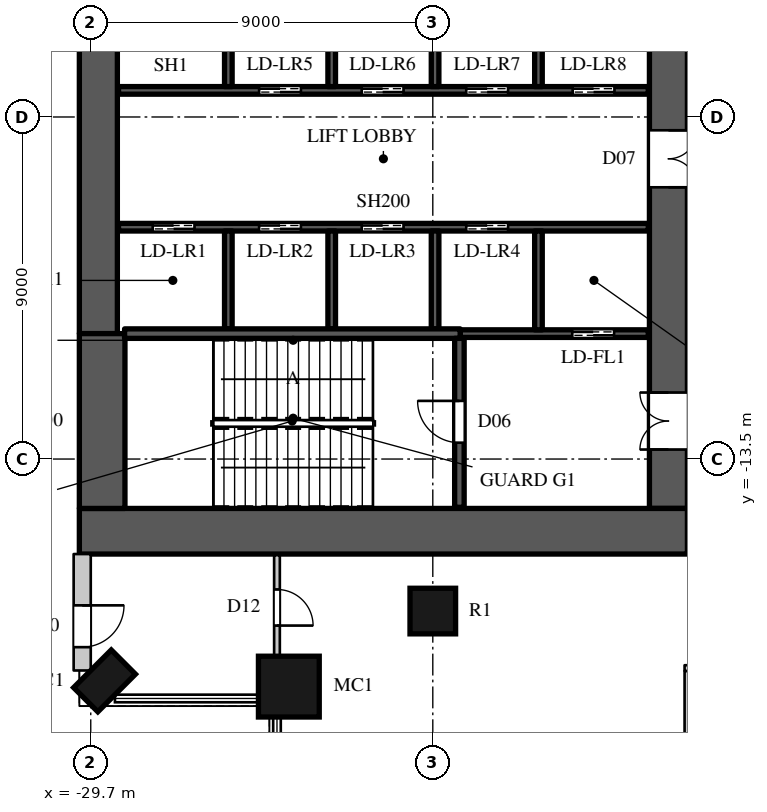
"""IFC4 building model, lengths in metres.
Left out: names, types, materials, properties, quantities, classifications, styles, units other than length and angle.
Written with IfcOpenShell. Run it as: python <this file> out.ifc"""

import sys

from ifc_helpers import new_model, si_unit, direction, frame, frame_2d, origin, origin_2d, place, context, subcontext, project, spatial, rectangle, circle, extrude, element, fill, save


model = new_model("IFC4")
c1 = context("Model", 3, precision=1e-05, world=origin(), true_north=direction((0.0, 1.0)))
c2 = subcontext(c1, "Body", "Model", "MODEL_VIEW")
j1 = project(units=[si_unit("LENGTHUNIT", "METRE"), si_unit("PLANEANGLEUNIT", "RADIAN")], contexts=[c1])
p1 = place(None, origin())
s1 = spatial("IfcSite", under=j1, at=p1, CompositionType="ELEMENT")
p2 = place(p1, origin())
s2 = spatial("IfcBuilding", under=s1, at=p2, CompositionType="ELEMENT")
p3 = place(p2, frame((0.0, 0.0, 50.0)))
s3 = spatial("IfcBuildingStorey", under=s2, at=p3, CompositionType="ELEMENT", Elevation=50.0)
p4 = place(p3, frame((-29.337, -19.337, 0.0), z_axis=(0.0, 0.0, 1.0), x_axis=(0.707106781187, -0.707106781187, 0.0)))
e1 = element("IfcColumn", 1, at=p4, inside=s3, PredefinedType="COLUMN", context=c2, shape_type="SweptSolid", body=[
    extrude(rectangle(XDim=0.9, YDim=1.4, at=origin_2d()), origin(), (0.0, 0.0, 1.0), 5.5),
])
p5 = place(p3, frame((-24.488, -19.488, 0.0), z_axis=(0.0, 0.0, 1.0), x_axis=(1.0, 0.0, 0.0)))
e2 = element("IfcColumn", 2, at=p5, inside=s3, PredefinedType="COLUMN", context=c2, shape_type="SweptSolid", body=[
    extrude(circle(Radius=0.8, at=origin_2d()), origin(), (0.0, 0.0, 1.0), 5.5),
])
p6 = place(p3, frame((-20.7, -17.5, 0.0), z_axis=(0.0, 0.0, 1.0), x_axis=(1.0, 0.0, 0.0)))
e3 = element("IfcColumn", 3, at=p6, inside=s3, PredefinedType="COLUMN", context=c2, shape_type="SweptSolid", body=[
    extrude(circle(Radius=0.6, at=origin_2d()), origin(), (0.0, 0.0, 1.0), 5.5),
])
p7 = place(p3, frame((-29.925, -16.0, 0.0), z_axis=(0.0, 0.0, 1.0), x_axis=(0.0, -1.0, 0.0)))
e4 = element("IfcWall", 4, at=p7, inside=s3, PredefinedType="SOLIDWALL", context=c2, shape_type="SweptSolid", body=[
    extrude(rectangle(XDim=3.064, YDim=0.45, at=frame_2d((1.532, 0.0))), origin(), (0.0, 0.0, 1.0), 5.2),
])
p8 = place(p7, frame((1.35, 0.0, 0.0)))
e5 = element("IfcOpeningElement", 5, at=p8, cuts=e4, PredefinedType="OPENING", context=c2, shape_type="SweptSolid", body=[
    extrude(rectangle(XDim=1.1, YDim=2.4, at=frame_2d((0.55, 1.2))), frame((0.0, 0.235, 0.0), z_axis=(0.0, -1.0, 0.0), x_axis=(1.0, 0.0, 0.0)), (0.0, 0.0, 1.0), 0.47),
])
p9 = place(p3, frame((-30.0, -15.4, 0.0), z_axis=(0.0, 0.0, 1.0), x_axis=(1.0, 0.0, 0.0)))
e6 = element("IfcWall", 6, at=p9, inside=s3, PredefinedType="SHEAR", context=c2, shape_type="SweptSolid", body=[
    extrude(rectangle(XDim=16.0, YDim=1.2, at=frame_2d((8.0, 0.0))), origin(), (0.0, 0.0, 1.0), 5.5),
])
p10 = place(p3, frame((-14.5, -14.8, 0.0), z_axis=(0.0, 0.0, 1.0), x_axis=(0.0, 1.0, 0.0)))
e7 = element("IfcWall", 7, at=p10, inside=s3, PredefinedType="SHEAR", context=c2, shape_type="SweptSolid", body=[
    extrude(rectangle(XDim=29.6, YDim=1.0, at=frame_2d((14.8, 0.0))), origin(), (0.0, 0.0, 1.0), 5.5),
])
p11 = place(p10, frame((1.55, 0.0, 0.0)))
e8 = element("IfcOpeningElement", 8, at=p11, cuts=e7, PredefinedType="OPENING", context=c2, shape_type="SweptSolid", body=[
    extrude(rectangle(XDim=1.5, YDim=2.4, at=frame_2d((0.75, 1.2))), frame((0.0, 0.51, 0.0), z_axis=(0.0, -1.0, 0.0), x_axis=(1.0, 0.0, 0.0)), (0.0, 0.0, 1.0), 1.02),
])
p12 = place(p10, frame((26.55, 0.0, 0.0)))
e9 = element("IfcOpeningElement", 9, at=p12, cuts=e7, PredefinedType="OPENING", context=c2, shape_type="SweptSolid", body=[
    extrude(rectangle(XDim=1.5, YDim=2.4, at=frame_2d((0.75, 1.2))), frame((0.0, 0.51, 0.0), z_axis=(0.0, -1.0, 0.0), x_axis=(1.0, 0.0, 0.0)), (0.0, 0.0, 1.0), 1.02),
])
p13 = place(p10, frame((8.45, 0.0, 0.0)))
e10 = element("IfcOpeningElement", 10, at=p13, cuts=e7, PredefinedType="OPENING", context=c2, shape_type="SweptSolid", body=[
    extrude(rectangle(XDim=1.5, YDim=2.4, at=frame_2d((0.75, 1.2))), frame((0.0, 0.51, 0.0), z_axis=(0.0, -1.0, 0.0), x_axis=(1.0, 0.0, 0.0)), (0.0, 0.0, 1.0), 1.02),
])
p14 = place(p10, frame((19.65, 0.0, 0.0)))
e11 = element("IfcOpeningElement", 11, at=p14, cuts=e7, PredefinedType="OPENING", context=c2, shape_type="SweptSolid", body=[
    extrude(rectangle(XDim=1.5, YDim=2.4, at=frame_2d((0.75, 1.2))), frame((0.0, 0.51, 0.0), z_axis=(0.0, -1.0, 0.0), x_axis=(1.0, 0.0, 0.0)), (0.0, 0.0, 1.0), 1.02),
])
p15 = place(p10, frame((14.5, 0.0, 0.0)))
e12 = element("IfcOpeningElement", 12, at=p15, cuts=e7, PredefinedType="OPENING", context=c2, shape_type="SweptSolid", body=[
    extrude(rectangle(XDim=0.6, YDim=2.0, at=frame_2d((0.3, 1.0))), frame((0.0, 0.51, 0.0), z_axis=(0.0, -1.0, 0.0), x_axis=(1.0, 0.0, 0.0)), (0.0, 0.0, 1.0), 1.02),
])
p16 = place(p3, frame((-29.5, -10.2, 0.0), z_axis=(0.0, 0.0, 1.0), x_axis=(0.0, 1.0, 0.0)))
e13 = element("IfcWall", 13, at=p16, inside=s3, PredefinedType="SHEAR", context=c2, shape_type="SweptSolid", body=[
    extrude(rectangle(XDim=20.4, YDim=1.0, at=frame_2d((10.2, 0.0))), origin(), (0.0, 0.0, 1.0), 5.5),
])
p17 = place(p3, frame((-29.4, -14.8, 0.0), z_axis=(0.0, 0.0, 1.0), x_axis=(0.0, 1.0, 0.0)))
e14 = element("IfcWall", 14, at=p17, inside=s3, PredefinedType="SHEAR", context=c2, shape_type="SweptSolid", body=[
    extrude(rectangle(XDim=4.6, YDim=1.2, at=frame_2d((2.3, 0.0))), origin(), (0.0, 0.0, 1.0), 5.5),
])
p18 = place(p3, frame((-24.8, -18.732, 0.0), z_axis=(0.0, 0.0, 1.0), x_axis=(0.0, 1.0, 0.0)))
e15 = element("IfcWall", 15, at=p18, inside=s3, PredefinedType="PARTITIONING", context=c2, shape_type="SweptSolid", body=[
    extrude(rectangle(XDim=2.702, YDim=0.15, at=frame_2d((1.351, 0.0))), origin(), (0.0, 0.0, 1.0), 5.2),
])
p19 = place(p18, frame((0.85, 0.0, 0.0)))
e16 = element("IfcOpeningElement", 16, at=p19, cuts=e15, PredefinedType="OPENING", context=c2, shape_type="SweptSolid", body=[
    extrude(rectangle(XDim=0.95, YDim=2.2, at=frame_2d((0.475, 1.1))), frame((0.0, 0.085, 0.0), z_axis=(0.0, -1.0, 0.0), x_axis=(1.0, 0.0, 0.0)), (0.0, 0.0, 1.0), 0.17),
])
p20 = place(p3, frame((-14.0, -25.755, 0.0), z_axis=(0.0, 0.0, 1.0), x_axis=(0.0, 1.0, 0.0)))
e17 = element("IfcWall", 17, at=p20, inside=s3, PredefinedType="PARTITIONING", context=c2, shape_type="SweptSolid", body=[
    extrude(rectangle(XDim=6.68, YDim=0.15, at=frame_2d((3.34, 0.0))), origin(), (0.0, 0.0, 1.0), 5.2),
])
p21 = place(p20, frame((2.9, 0.0, 0.0)))
e18 = element("IfcOpeningElement", 18, at=p21, cuts=e17, PredefinedType="OPENING", context=c2, shape_type="SweptSolid", body=[
    extrude(rectangle(XDim=0.9, YDim=2.2, at=frame_2d((0.45, 1.1))), frame((0.0, 0.085, 0.0), z_axis=(0.0, -1.0, 0.0), x_axis=(1.0, 0.0, 0.0)), (0.0, 0.0, 1.0), 0.17),
])
p22 = place(p3, frame((-14.075, -19.0, 0.0), z_axis=(0.0, 0.0, 1.0), x_axis=(1.0, 0.0, 0.0)))
e19 = element("IfcWall", 19, at=p22, inside=s3, PredefinedType="PARTITIONING", context=c2, shape_type="SweptSolid", body=[
    extrude(rectangle(XDim=10.15, YDim=0.15, at=frame_2d((5.075, 0.0))), origin(), (0.0, 0.0, 1.0), 5.2),
])
p23 = place(p3, frame((-28.97, -7.4, 0.0), z_axis=(0.0, 0.0, 1.0), x_axis=(1.0, 0.0, 0.0)))
e20 = element("IfcWall", 20, at=p23, inside=s3, PredefinedType="SHEAR", context=c2, shape_type="SweptSolid", body=[
    extrude(rectangle(XDim=13.94, YDim=0.2, at=frame_2d((6.97, 0.0))), origin(), (0.0, 0.0, 1.0), 5.2),
])
p24 = place(p23, frame((0.9, 0.0, 0.0)))
e21 = element("IfcOpeningElement", 21, at=p24, cuts=e20, PredefinedType="OPENING", context=c2, shape_type="SweptSolid", body=[
    extrude(rectangle(XDim=1.1, YDim=2.2, at=frame_2d((0.55, 1.1))), frame((0.0, 0.11, 0.0), z_axis=(0.0, -1.0, 0.0), x_axis=(1.0, 0.0, 0.0)), (0.0, 0.0, 1.0), 0.22),
])
p25 = place(p23, frame((3.7, 0.0, 0.0)))
e22 = element("IfcOpeningElement", 22, at=p25, cuts=e20, PredefinedType="OPENING", context=c2, shape_type="SweptSolid", body=[
    extrude(rectangle(XDim=1.1, YDim=2.2, at=frame_2d((0.55, 1.1))), frame((0.0, 0.11, 0.0), z_axis=(0.0, -1.0, 0.0), x_axis=(1.0, 0.0, 0.0)), (0.0, 0.0, 1.0), 0.22),
])
p26 = place(p23, frame((6.4, 0.0, 0.0)))
e23 = element("IfcOpeningElement", 23, at=p26, cuts=e20, PredefinedType="OPENING", context=c2, shape_type="SweptSolid", body=[
    extrude(rectangle(XDim=1.1, YDim=2.2, at=frame_2d((0.55, 1.1))), frame((0.0, 0.11, 0.0), z_axis=(0.0, -1.0, 0.0), x_axis=(1.0, 0.0, 0.0)), (0.0, 0.0, 1.0), 0.22),
])
p27 = place(p23, frame((9.15, 0.0, 0.0)))
e24 = element("IfcOpeningElement", 24, at=p27, cuts=e20, PredefinedType="OPENING", context=c2, shape_type="SweptSolid", body=[
    extrude(rectangle(XDim=1.1, YDim=2.2, at=frame_2d((0.55, 1.1))), frame((0.0, 0.11, 0.0), z_axis=(0.0, -1.0, 0.0), x_axis=(1.0, 0.0, 0.0)), (0.0, 0.0, 1.0), 0.22),
])
p28 = place(p3, frame((-28.97, -3.8, 0.0), z_axis=(0.0, 0.0, 1.0), x_axis=(1.0, 0.0, 0.0)))
e25 = element("IfcWall", 25, at=p28, inside=s3, PredefinedType="SHEAR", context=c2, shape_type="SweptSolid", body=[
    extrude(rectangle(XDim=13.94, YDim=0.2, at=frame_2d((6.97, 0.0))), origin(), (0.0, 0.0, 1.0), 5.2),
])
p29 = place(p28, frame((3.7, 0.0, 0.0)))
e26 = element("IfcOpeningElement", 26, at=p29, cuts=e25, PredefinedType="OPENING", context=c2, shape_type="SweptSolid", body=[
    extrude(rectangle(XDim=1.1, YDim=2.2, at=frame_2d((0.55, 1.1))), frame((0.0, 0.11, 0.0), z_axis=(0.0, -1.0, 0.0), x_axis=(1.0, 0.0, 0.0)), (0.0, 0.0, 1.0), 0.22),
])
p30 = place(p28, frame((6.4, 0.0, 0.0)))
e27 = element("IfcOpeningElement", 27, at=p30, cuts=e25, PredefinedType="OPENING", context=c2, shape_type="SweptSolid", body=[
    extrude(rectangle(XDim=1.1, YDim=2.2, at=frame_2d((0.55, 1.1))), frame((0.0, 0.11, 0.0), z_axis=(0.0, -1.0, 0.0), x_axis=(1.0, 0.0, 0.0)), (0.0, 0.0, 1.0), 0.22),
])
p31 = place(p28, frame((9.15, 0.0, 0.0)))
e28 = element("IfcOpeningElement", 28, at=p31, cuts=e25, PredefinedType="OPENING", context=c2, shape_type="SweptSolid", body=[
    extrude(rectangle(XDim=1.1, YDim=2.2, at=frame_2d((0.55, 1.1))), frame((0.0, 0.11, 0.0), z_axis=(0.0, -1.0, 0.0), x_axis=(1.0, 0.0, 0.0)), (0.0, 0.0, 1.0), 0.22),
])
p32 = place(p28, frame((11.95, 0.0, 0.0)))
e29 = element("IfcOpeningElement", 29, at=p32, cuts=e25, PredefinedType="OPENING", context=c2, shape_type="SweptSolid", body=[
    extrude(rectangle(XDim=1.1, YDim=2.2, at=frame_2d((0.55, 1.1))), frame((0.0, 0.11, 0.0), z_axis=(0.0, -1.0, 0.0), x_axis=(1.0, 0.0, 0.0)), (0.0, 0.0, 1.0), 0.22),
])
p33 = place(p3, frame((-26.08, -10.075, 0.0), z_axis=(0.0, 0.0, 1.0), x_axis=(0.0, 1.0, 0.0)))
e30 = element("IfcWall", 30, at=p33, inside=s3, PredefinedType="SHEAR", context=c2, shape_type="SweptSolid", body=[
    extrude(rectangle(XDim=2.575, YDim=0.2, at=frame_2d((1.288, 0.0))), origin(), (0.0, 0.0, 1.0), 5.5),
])
p34 = place(p3, frame((-26.08, -3.7, 0.0), z_axis=(0.0, 0.0, 1.0), x_axis=(0.0, 1.0, 0.0)))
e31 = element("IfcWall", 31, at=p34, inside=s3, PredefinedType="SHEAR", context=c2, shape_type="SweptSolid", body=[
    extrude(rectangle(XDim=2.6, YDim=0.2, at=frame_2d((1.3, 0.0))), origin(), (0.0, 0.0, 1.0), 5.5),
])
p35 = place(p3, frame((-23.36, -10.075, 0.0), z_axis=(0.0, 0.0, 1.0), x_axis=(0.0, 1.0, 0.0)))
e32 = element("IfcWall", 32, at=p35, inside=s3, PredefinedType="SHEAR", context=c2, shape_type="SweptSolid", body=[
    extrude(rectangle(XDim=2.575, YDim=0.2, at=frame_2d((1.288, 0.0))), origin(), (0.0, 0.0, 1.0), 5.5),
])
p36 = place(p3, frame((-23.36, -3.7, 0.0), z_axis=(0.0, 0.0, 1.0), x_axis=(0.0, 1.0, 0.0)))
e33 = element("IfcWall", 33, at=p36, inside=s3, PredefinedType="SHEAR", context=c2, shape_type="SweptSolid", body=[
    extrude(rectangle(XDim=2.6, YDim=0.2, at=frame_2d((1.3, 0.0))), origin(), (0.0, 0.0, 1.0), 5.5),
])
p37 = place(p3, frame((-20.64, -10.075, 0.0), z_axis=(0.0, 0.0, 1.0), x_axis=(0.0, 1.0, 0.0)))
e34 = element("IfcWall", 34, at=p37, inside=s3, PredefinedType="SHEAR", context=c2, shape_type="SweptSolid", body=[
    extrude(rectangle(XDim=2.575, YDim=0.2, at=frame_2d((1.288, 0.0))), origin(), (0.0, 0.0, 1.0), 5.5),
])
p38 = place(p3, frame((-20.64, -3.7, 0.0), z_axis=(0.0, 0.0, 1.0), x_axis=(0.0, 1.0, 0.0)))
e35 = element("IfcWall", 35, at=p38, inside=s3, PredefinedType="SHEAR", context=c2, shape_type="SweptSolid", body=[
    extrude(rectangle(XDim=2.6, YDim=0.2, at=frame_2d((1.3, 0.0))), origin(), (0.0, 0.0, 1.0), 5.5),
])
p39 = place(p3, frame((-19.98, -10.2, 0.0), z_axis=(0.0, 0.0, 1.0), x_axis=(1.0, 0.0, 0.0)))
e36 = element("IfcWall", 36, at=p39, inside=s3, PredefinedType="SHEAR", context=c2, shape_type="SweptSolid", body=[
    extrude(rectangle(XDim=4.95, YDim=0.2, at=frame_2d((2.475, 0.0))), origin(), (0.0, 0.0, 1.0), 5.2),
])
p40 = place(p39, frame((2.95, 0.0, 0.0)))
e37 = element("IfcOpeningElement", 37, at=p40, cuts=e36, PredefinedType="OPENING", context=c2, shape_type="SweptSolid", body=[
    extrude(rectangle(XDim=1.1, YDim=2.2, at=frame_2d((0.55, 1.1))), frame((0.0, 0.11, 0.0), z_axis=(0.0, -1.0, 0.0), x_axis=(1.0, 0.0, 0.0)), (0.0, 0.0, 1.0), 0.22),
])
p41 = place(p3, frame((-17.92, -10.1, 0.0), z_axis=(0.0, 0.0, 1.0), x_axis=(0.0, 1.0, 0.0)))
e38 = element("IfcWall", 38, at=p41, inside=s3, PredefinedType="SHEAR", context=c2, shape_type="SweptSolid", body=[
    extrude(rectangle(XDim=2.6, YDim=0.2, at=frame_2d((1.3, 0.0))), origin(), (0.0, 0.0, 1.0), 5.5),
])
p42 = place(p3, frame((-17.92, -3.7, 0.0), z_axis=(0.0, 0.0, 1.0), x_axis=(0.0, 1.0, 0.0)))
e39 = element("IfcWall", 39, at=p42, inside=s3, PredefinedType="SHEAR", context=c2, shape_type="SweptSolid", body=[
    extrude(rectangle(XDim=2.6, YDim=0.2, at=frame_2d((1.3, 0.0))), origin(), (0.0, 0.0, 1.0), 5.5),
])
p43 = place(p3, frame((-28.81, -10.2, 0.0), z_axis=(0.0, 0.0, 1.0), x_axis=(1.0, 0.0, 0.0)))
e40 = element("IfcWall", 40, at=p43, inside=s3, PredefinedType="SHEAR", context=c2, shape_type="SweptSolid", body=[
    extrude(rectangle(XDim=8.83, YDim=0.25, at=frame_2d((4.415, 0.0))), origin(), (0.0, 0.0, 1.0), 5.2),
])
p44 = place(p3, frame((-20.0, -14.77, 0.0), z_axis=(0.0, 0.0, 1.0), x_axis=(0.0, 1.0, 0.0)))
e41 = element("IfcWall", 41, at=p44, inside=s3, PredefinedType="SHEAR", context=c2, shape_type="SweptSolid", body=[
    extrude(rectangle(XDim=4.445, YDim=0.25, at=frame_2d((2.223, 0.0))), origin(), (0.0, 0.0, 1.0), 5.2),
])
p45 = place(p44, frame((1.7, 0.0, 0.0)))
e42 = element("IfcOpeningElement", 42, at=p45, cuts=e41, PredefinedType="OPENING", context=c2, shape_type="SweptSolid", body=[
    extrude(rectangle(XDim=1.1, YDim=2.2, at=frame_2d((0.55, 1.1))), frame((0.0, 0.135, 0.0), z_axis=(0.0, -1.0, 0.0), x_axis=(1.0, 0.0, 0.0)), (0.0, 0.0, 1.0), 0.27),
])
p46 = place(p8, origin())
e43 = element("IfcDoor", 43, at=p46, inside=s3, OperationType="SINGLE_SWING_LEFT", PredefinedType="DOOR", context=c2, shape_type="SweptSolid", body=[
    extrude(rectangle(XDim=1.1, YDim=2.4, at=frame_2d((0.55, 1.2))), frame((0.0, 0.025, 0.0), z_axis=(0.0, -1.0, 0.0), x_axis=(1.0, 0.0, 0.0)), (0.0, 0.0, 1.0), 0.05),
])
fill(e5, e43)
p47 = place(p45, origin())
e44 = element("IfcDoor", 44, at=p47, inside=s3, OperationType="SINGLE_SWING_RIGHT", PredefinedType="DOOR", context=c2, shape_type="SweptSolid", body=[
    extrude(rectangle(XDim=1.1, YDim=2.2, at=frame_2d((0.55, 1.1))), frame((0.0, 0.025, 0.0), z_axis=(0.0, -1.0, 0.0), x_axis=(1.0, 0.0, 0.0)), (0.0, 0.0, 1.0), 0.05),
])
fill(e42, e44)
p48 = place(p24, origin())
e45 = element("IfcDoor", 45, at=p48, inside=s3, OperationType="DOUBLE_DOOR_SLIDING", PredefinedType="DOOR", context=c2, shape_type="SweptSolid", body=[
    extrude(rectangle(XDim=1.1, YDim=2.2, at=frame_2d((0.55, 1.1))), frame((0.0, 0.025, 0.0), z_axis=(0.0, -1.0, 0.0), x_axis=(1.0, 0.0, 0.0)), (0.0, 0.0, 1.0), 0.05),
])
fill(e21, e45)
p49 = place(p25, origin())
e46 = element("IfcDoor", 46, at=p49, inside=s3, OperationType="DOUBLE_DOOR_SLIDING", PredefinedType="DOOR", context=c2, shape_type="SweptSolid", body=[
    extrude(rectangle(XDim=1.1, YDim=2.2, at=frame_2d((0.55, 1.1))), frame((0.0, 0.025, 0.0), z_axis=(0.0, -1.0, 0.0), x_axis=(1.0, 0.0, 0.0)), (0.0, 0.0, 1.0), 0.05),
])
fill(e22, e46)
p50 = place(p26, origin())
e47 = element("IfcDoor", 47, at=p50, inside=s3, OperationType="DOUBLE_DOOR_SLIDING", PredefinedType="DOOR", context=c2, shape_type="SweptSolid", body=[
    extrude(rectangle(XDim=1.1, YDim=2.2, at=frame_2d((0.55, 1.1))), frame((0.0, 0.025, 0.0), z_axis=(0.0, -1.0, 0.0), x_axis=(1.0, 0.0, 0.0)), (0.0, 0.0, 1.0), 0.05),
])
fill(e23, e47)
p51 = place(p27, origin())
e48 = element("IfcDoor", 48, at=p51, inside=s3, OperationType="DOUBLE_DOOR_SLIDING", PredefinedType="DOOR", context=c2, shape_type="SweptSolid", body=[
    extrude(rectangle(XDim=1.1, YDim=2.2, at=frame_2d((0.55, 1.1))), frame((0.0, 0.025, 0.0), z_axis=(0.0, -1.0, 0.0), x_axis=(1.0, 0.0, 0.0)), (0.0, 0.0, 1.0), 0.05),
])
fill(e24, e48)
p52 = place(p40, origin())
e49 = element("IfcDoor", 49, at=p52, inside=s3, OperationType="DOUBLE_DOOR_SLIDING", PredefinedType="DOOR", context=c2, shape_type="SweptSolid", body=[
    extrude(rectangle(XDim=1.1, YDim=2.2, at=frame_2d((0.55, 1.1))), frame((0.0, 0.025, 0.0), z_axis=(0.0, -1.0, 0.0), x_axis=(1.0, 0.0, 0.0)), (0.0, 0.0, 1.0), 0.05),
])
fill(e37, e49)
p53 = place(p29, origin())
e50 = element("IfcDoor", 50, at=p53, inside=s3, OperationType="DOUBLE_DOOR_SLIDING", PredefinedType="DOOR", context=c2, shape_type="SweptSolid", body=[
    extrude(rectangle(XDim=1.1, YDim=2.2, at=frame_2d((0.55, 1.1))), frame((0.0, 0.025, 0.0), z_axis=(0.0, -1.0, 0.0), x_axis=(1.0, 0.0, 0.0)), (0.0, 0.0, 1.0), 0.05),
])
fill(e26, e50)
p54 = place(p30, origin())
e51 = element("IfcDoor", 51, at=p54, inside=s3, OperationType="DOUBLE_DOOR_SLIDING", PredefinedType="DOOR", context=c2, shape_type="SweptSolid", body=[
    extrude(rectangle(XDim=1.1, YDim=2.2, at=frame_2d((0.55, 1.1))), frame((0.0, 0.025, 0.0), z_axis=(0.0, -1.0, 0.0), x_axis=(1.0, 0.0, 0.0)), (0.0, 0.0, 1.0), 0.05),
])
fill(e27, e51)
p55 = place(p31, origin())
e52 = element("IfcDoor", 52, at=p55, inside=s3, OperationType="DOUBLE_DOOR_SLIDING", PredefinedType="DOOR", context=c2, shape_type="SweptSolid", body=[
    extrude(rectangle(XDim=1.1, YDim=2.2, at=frame_2d((0.55, 1.1))), frame((0.0, 0.025, 0.0), z_axis=(0.0, -1.0, 0.0), x_axis=(1.0, 0.0, 0.0)), (0.0, 0.0, 1.0), 0.05),
])
fill(e28, e52)
p56 = place(p32, origin())
e53 = element("IfcDoor", 53, at=p56, inside=s3, OperationType="DOUBLE_DOOR_SLIDING", PredefinedType="DOOR", context=c2, shape_type="SweptSolid", body=[
    extrude(rectangle(XDim=1.1, YDim=2.2, at=frame_2d((0.55, 1.1))), frame((0.0, 0.025, 0.0), z_axis=(0.0, -1.0, 0.0), x_axis=(1.0, 0.0, 0.0)), (0.0, 0.0, 1.0), 0.05),
])
fill(e29, e53)
p57 = place(p19, origin())
e54 = element("IfcDoor", 54, at=p57, inside=s3, OperationType="SINGLE_SWING_RIGHT", PredefinedType="DOOR", context=c2, shape_type="SweptSolid", body=[
    extrude(rectangle(XDim=0.95, YDim=2.2, at=frame_2d((0.475, 1.1))), frame((0.0, 0.025, 0.0), z_axis=(0.0, -1.0, 0.0), x_axis=(1.0, 0.0, 0.0)), (0.0, 0.0, 1.0), 0.05),
])
fill(e16, e54)
p58 = place(p11, origin())
e55 = element("IfcDoor", 55, at=p58, inside=s3, OperationType="DOUBLE_DOOR_SINGLE_SWING", PredefinedType="DOOR", context=c2, shape_type="SweptSolid", body=[
    extrude(rectangle(XDim=1.5, YDim=2.4, at=frame_2d((0.75, 1.2))), frame((0.0, 0.495, 0.0), z_axis=(0.0, -1.0, 0.0), x_axis=(1.0, 0.0, 0.0)), (0.0, 0.0, 1.0), 0.05),
])
fill(e8, e55)
p59 = place(p13, origin())
e56 = element("IfcDoor", 56, at=p59, inside=s3, OperationType="DOUBLE_DOOR_SINGLE_SWING", PredefinedType="DOOR", context=c2, shape_type="SweptSolid", body=[
    extrude(rectangle(XDim=1.5, YDim=2.4, at=frame_2d((0.75, 1.2))), frame((0.0, -0.445, 0.0), z_axis=(0.0, -1.0, 0.0), x_axis=(1.0, 0.0, 0.0)), (0.0, 0.0, 1.0), 0.05),
])
fill(e10, e56)
save(model, sys.argv[1])
